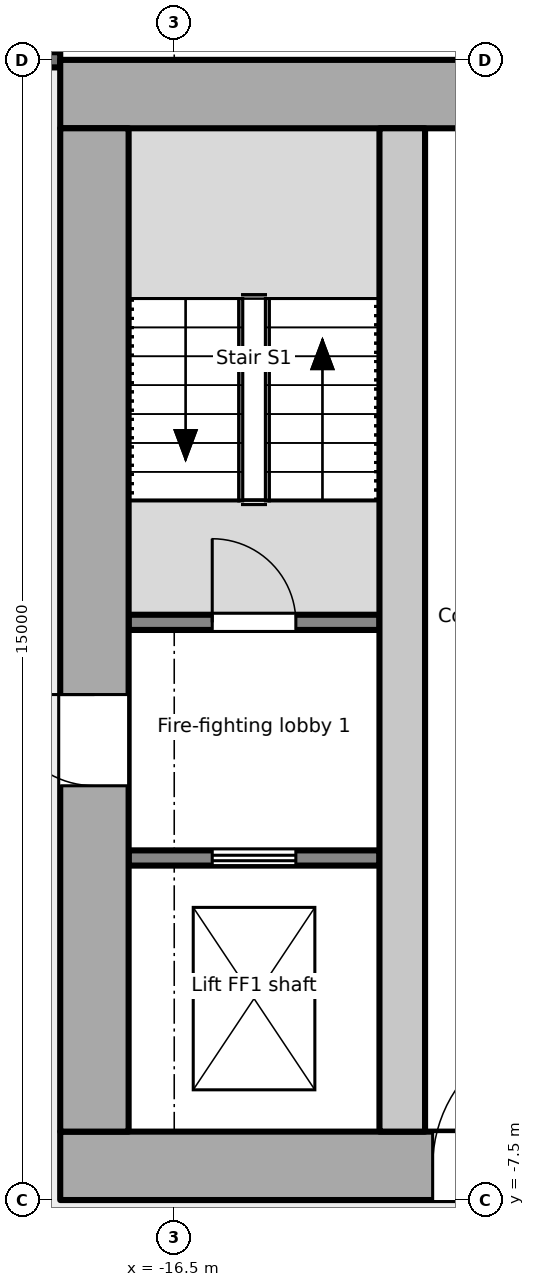
"""IFC4 building model, lengths in metres.
Left out: names, types, materials, properties, quantities, classifications, styles, units other than length and angle.
Written with IfcOpenShell. Run it as: python <this file> out.ifc"""

import sys

from ifc_helpers import new_model, si_unit, direction, frame, frame_2d, origin, place, context, subcontext, project, spatial, rectangle, extrude, element, fill, save


model = new_model("IFC4")
c1 = context("Model", 3, precision=1e-05, world=origin(), true_north=direction((0.0, 1.0)))
c2 = subcontext(c1, "Body", "Model", "MODEL_VIEW")
j1 = project(units=[si_unit("LENGTHUNIT", "METRE"), si_unit("PLANEANGLEUNIT", "RADIAN")], contexts=[c1])
p1 = place(None, origin())
s1 = spatial("IfcSite", under=j1, at=p1, CompositionType="ELEMENT")
p2 = place(p1, origin())
s2 = spatial("IfcBuilding", under=s1, at=p2, CompositionType="ELEMENT")
p3 = place(p2, frame((0.0, 0.0, 249.7)))
s3 = spatial("IfcBuildingStorey", under=s2, at=p3, CompositionType="ELEMENT", Elevation=249.7)
p4 = place(p3, frame((-18.0, -7.05, -0.2), z_axis=(0.0, 0.0, 1.0), x_axis=(1.0, 0.0, 0.0)))
e1 = element("IfcWall", 1, at=p4, inside=s3, PredefinedType="SHEAR", context=c2, shape_type="SweptSolid", body=[
    extrude(rectangle(XDim=36.0, YDim=0.9, at=frame_2d((18.0, 0.0))), origin(), (0.0, 0.0, 1.0), 5.4),
])
p5 = place(p4, frame((4.9, 0.0, 0.2)))
e2 = element("IfcOpeningElement", 2, at=p5, cuts=e1, PredefinedType="OPENING", context=c2, shape_type="SweptSolid", body=[
    extrude(rectangle(XDim=1.8, YDim=2.1, at=frame_2d((0.9, 1.05))), frame((0.0, 0.46, 0.0), z_axis=(0.0, -1.0, 0.0), x_axis=(1.0, 0.0, 0.0)), (0.0, 0.0, 1.0), 0.921),
])
p6 = place(p4, frame((16.8, 0.0, 0.2)))
e3 = element("IfcOpeningElement", 3, at=p6, cuts=e1, PredefinedType="OPENING", context=c2, shape_type="SweptSolid", body=[
    extrude(rectangle(XDim=2.4, YDim=2.1, at=frame_2d((1.2, 1.05))), frame((0.0, 0.46, 0.0), z_axis=(0.0, -1.0, 0.0), x_axis=(1.0, 0.0, 0.0)), (0.0, 0.0, 1.0), 0.921),
])
p7 = place(p4, frame((26.1, 0.0, 0.2)))
e4 = element("IfcOpeningElement", 4, at=p7, cuts=e1, PredefinedType="OPENING", context=c2, shape_type="SweptSolid", body=[
    extrude(rectangle(XDim=2.4, YDim=2.1, at=frame_2d((1.2, 1.05))), frame((0.0, 0.46, 0.0), z_axis=(0.0, -1.0, 0.0), x_axis=(1.0, 0.0, 0.0)), (0.0, 0.0, 1.0), 0.921),
])
p8 = place(p3, frame((-18.0, 7.05, -0.2), z_axis=(0.0, 0.0, 1.0), x_axis=(1.0, 0.0, 0.0)))
e5 = element("IfcWall", 5, at=p8, inside=s3, PredefinedType="SHEAR", context=c2, shape_type="SweptSolid", body=[
    extrude(rectangle(XDim=36.0, YDim=0.9, at=frame_2d((18.0, 0.0))), origin(), (0.0, 0.0, 1.0), 5.4),
])
p9 = place(p3, frame((-17.55, -6.6, -0.2), z_axis=(0.0, 0.0, 1.0), x_axis=(0.0, 1.0, 0.0)))
e6 = element("IfcWall", 6, at=p9, inside=s3, PredefinedType="SHEAR", context=c2, shape_type="SweptSolid", body=[
    extrude(rectangle(XDim=13.2, YDim=0.9, at=frame_2d((6.6, 0.0))), origin(), (0.0, 0.0, 1.0), 5.4),
])
p10 = place(p9, frame((4.55, 0.0, 0.2)))
e7 = element("IfcOpeningElement", 7, at=p10, cuts=e6, PredefinedType="OPENING", context=c2, shape_type="SweptSolid", body=[
    extrude(rectangle(XDim=1.2, YDim=2.1, at=frame_2d((0.6, 1.05))), frame((0.0, 0.46, 0.0), z_axis=(0.0, -1.0, 0.0), x_axis=(1.0, 0.0, 0.0)), (0.0, 0.0, 1.0), 0.921),
])
p11 = place(p3, frame((-13.5, -6.6, -0.2), z_axis=(0.0, 0.0, 1.0), x_axis=(0.0, 1.0, 0.0)))
e8 = element("IfcWall", 8, at=p11, inside=s3, PredefinedType="SHEAR", context=c2, shape_type="SweptSolid", body=[
    extrude(rectangle(XDim=13.2, YDim=0.6, at=frame_2d((6.6, 0.0))), origin(), (0.0, 0.0, 1.0), 5.4),
])
p12 = place(p3, frame((-17.1, -3.0, 0.0), z_axis=(0.0, 0.0, 1.0), x_axis=(1.0, 0.0, 0.0)))
e9 = element("IfcWall", 9, at=p12, inside=s3, PredefinedType="PARTITIONING", context=c2, shape_type="SweptSolid", body=[
    extrude(rectangle(XDim=3.3, YDim=0.2, at=frame_2d((1.65, 0.0))), origin(), (0.0, 0.0, 1.0), 5.2),
])
p13 = place(p12, frame((1.1, 0.0, 0.0)))
e10 = element("IfcOpeningElement", 10, at=p13, cuts=e9, PredefinedType="OPENING", context=c2, shape_type="SweptSolid", body=[
    extrude(rectangle(XDim=1.1, YDim=2.1, at=frame_2d((0.55, 1.05))), frame((0.0, 0.111, 0.0), z_axis=(0.0, -1.0, 0.0), x_axis=(1.0, 0.0, 0.0)), (0.0, 0.0, 1.0), 0.221),
])
p14 = place(p3, frame((-17.1, 0.1, 0.0), z_axis=(0.0, 0.0, 1.0), x_axis=(1.0, 0.0, 0.0)))
e11 = element("IfcWall", 11, at=p14, inside=s3, PredefinedType="PARTITIONING", context=c2, shape_type="SweptSolid", body=[
    extrude(rectangle(XDim=3.3, YDim=0.2, at=frame_2d((1.65, 0.0))), origin(), (0.0, 0.0, 1.0), 5.2),
])
p15 = place(p14, frame((1.1, 0.0, 0.0)))
e12 = element("IfcOpeningElement", 12, at=p15, cuts=e11, PredefinedType="OPENING", context=c2, shape_type="SweptSolid", body=[
    extrude(rectangle(XDim=1.1, YDim=2.1, at=frame_2d((0.55, 1.05))), frame((0.0, 0.111, 0.0), z_axis=(0.0, -1.0, 0.0), x_axis=(1.0, 0.0, 0.0)), (0.0, 0.0, 1.0), 0.221),
])
p16 = place(p3, frame((-21.2, 7.501, 0.0), z_axis=(0.0, 0.0, 1.0), x_axis=(1.0, 0.0, 0.0)))
e13 = element("IfcWall", 13, at=p16, inside=s3, PredefinedType="PARTITIONING", context=c2, shape_type="SweptSolid", body=[
    extrude(rectangle(XDim=3.2, YDim=0.2, at=frame_2d((1.6, 0.0))), origin(), (0.0, 0.0, 1.0), 5.2),
])
p17 = place(p13, origin())
e14 = element("IfcDoor", 14, at=p17, inside=s3, OperationType="DOUBLE_DOOR_SLIDING", PredefinedType="DOOR", context=c2, shape_type="SweptSolid", body=[
    extrude(rectangle(XDim=1.1, YDim=2.1, at=frame_2d((0.55, 1.05))), frame((0.0, 0.025, 0.0), z_axis=(0.0, -1.0, 0.0), x_axis=(1.0, 0.0, 0.0)), (0.0, 0.0, 1.0), 0.05),
])
fill(e10, e14)
p18 = place(p10, origin())
e15 = element("IfcDoor", 15, at=p18, inside=s3, OperationType="SINGLE_SWING_RIGHT", PredefinedType="DOOR", context=c2, shape_type="SweptSolid", body=[
    extrude(rectangle(XDim=1.2, YDim=2.1, at=frame_2d((0.6, 1.05))), frame((0.0, 0.025, 0.0), z_axis=(0.0, -1.0, 0.0), x_axis=(1.0, 0.0, 0.0)), (0.0, 0.0, 1.0), 0.05),
])
fill(e7, e15)
p19 = place(p15, origin())
e16 = element("IfcDoor", 16, at=p19, inside=s3, OperationType="SINGLE_SWING_LEFT", PredefinedType="DOOR", context=c2, shape_type="SweptSolid", body=[
    extrude(rectangle(XDim=1.1, YDim=2.1, at=frame_2d((0.55, 1.05))), frame((0.0, 0.025, 0.0), z_axis=(0.0, -1.0, 0.0), x_axis=(1.0, 0.0, 0.0)), (0.0, 0.0, 1.0), 0.05),
])
fill(e12, e16)
p20 = place(p5, origin())
e17 = element("IfcDoor", 17, at=p20, inside=s3, OperationType="SINGLE_SWING_RIGHT", PredefinedType="DOOR", context=c2, shape_type="SweptSolid", body=[
    extrude(rectangle(XDim=1.8, YDim=2.1, at=frame_2d((0.9, 1.05))), frame((0.0, 0.025, 0.0), z_axis=(0.0, -1.0, 0.0), x_axis=(1.0, 0.0, 0.0)), (0.0, 0.0, 1.0), 0.05),
])
fill(e2, e17)
save(model, sys.argv[1])
